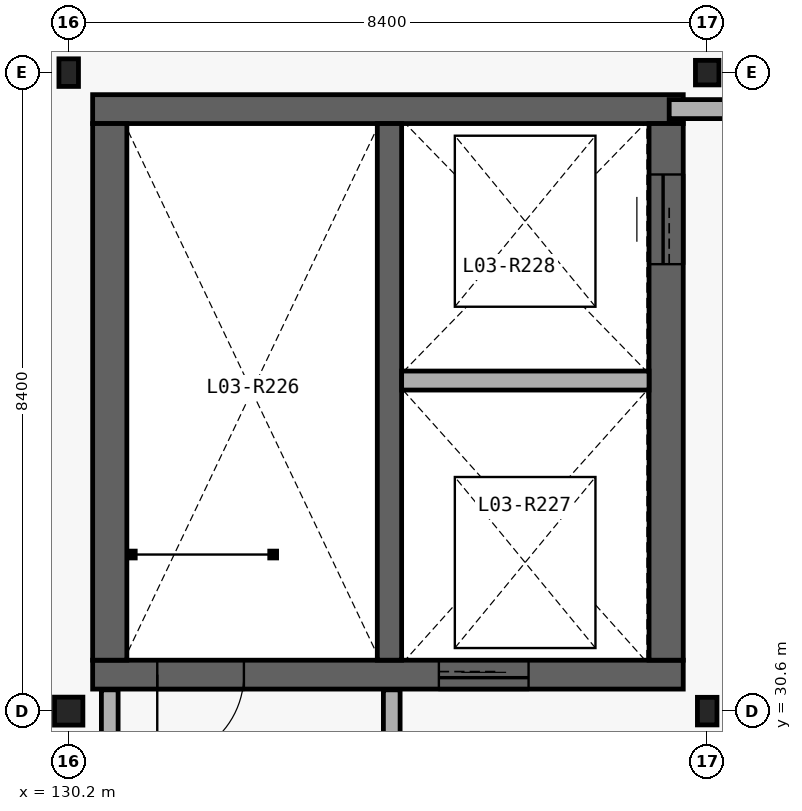
"""IFC4 building model, lengths in metres.
Left out: names, types, materials, properties, quantities, classifications, styles, units other than length and angle.
Written with IfcOpenShell. Run it as: python <this file> out.ifc"""

import sys

from ifc_helpers import new_model, si_unit, direction, frame, frame_2d, origin_with_axes, origin_2d_with_axis, place, context, subcontext, project, spatial, rectangle, i_section, extrude, element, fill, save


model = new_model("IFC4")
c1 = context("Model", 3, precision=1e-05, world=origin_with_axes(), true_north=direction((0.0, 1.0)))
c2 = subcontext(c1, "Body", "Model", "MODEL_VIEW")
j1 = project(units=[si_unit("LENGTHUNIT", "METRE"), si_unit("PLANEANGLEUNIT", "RADIAN")], contexts=[c1])
p1 = place(None, origin_with_axes())
s1 = spatial("IfcSite", under=j1, at=p1, CompositionType="ELEMENT")
p2 = place(p1, origin_with_axes())
s2 = spatial("IfcBuilding", under=s1, at=p2, CompositionType="ELEMENT")
p3 = place(p2, frame((0.0, 0.0, 15.6), z_axis=(0.0, 0.0, 1.0), x_axis=(1.0, 0.0, 0.0)))
s3 = spatial("IfcBuildingStorey", under=s2, at=p3, CompositionType="ELEMENT", Elevation=15.6)
p4 = place(None, frame((130.515, 31.08, 15.6), z_axis=(0.0, 0.0, 1.0), x_axis=(1.0, 0.0, 0.0)))
e1 = element("IfcWall", 1, at=p4, inside=s3, PredefinedType="SHEAR", context=c2, shape_type="SweptSolid", body=[
    extrude(rectangle(XDim=7.77, YDim=0.38, at=frame_2d((3.885, 0.0), x_axis=(1.0, 0.0))), origin_with_axes(), (0.0, 0.0, 1.0), 4.8),
])
p5 = place(None, frame((131.935, 31.08, 15.6), z_axis=(0.0, 0.0, 1.0), x_axis=(1.0, 0.0, 0.0)))
e2 = element("IfcOpeningElement", 2, at=p5, cuts=e1, PredefinedType="OPENING", context=c2, shape_type="SweptSolid", body=[
    extrude(rectangle(XDim=1.14, YDim=2.18, at=frame_2d((0.0, 1.09), x_axis=(1.0, 0.0))), frame((0.0, 0.2, 0.0), z_axis=(0.0, -1.0, 0.0), x_axis=(1.0, 0.0, 0.0)), (0.0, 0.0, 1.0), 0.4),
])
p6 = place(None, frame((135.66, 31.08, 15.6), z_axis=(0.0, 0.0, 1.0), x_axis=(1.0, 0.0, 0.0)))
e3 = element("IfcOpeningElement", 3, at=p6, cuts=e1, PredefinedType="OPENING", context=c2, shape_type="SweptSolid", body=[
    extrude(rectangle(XDim=1.18, YDim=2.24, at=frame_2d((0.0, 1.12), x_axis=(1.0, 0.0))), frame((0.0, 0.2, 0.0), z_axis=(0.0, -1.0, 0.0), x_axis=(1.0, 0.0, 0.0)), (0.0, 0.0, 1.0), 0.4),
])
p7 = place(None, frame((138.285, 38.52, 15.6), z_axis=(0.0, 0.0, 1.0), x_axis=(-1.0, 0.0, 0.0)))
e4 = element("IfcWall", 4, at=p7, inside=s3, PredefinedType="SHEAR", context=c2, shape_type="SweptSolid", body=[
    extrude(rectangle(XDim=7.77, YDim=0.38, at=frame_2d((3.885, 0.0), x_axis=(1.0, 0.0))), origin_with_axes(), (0.0, 0.0, 1.0), 4.8),
])
p8 = place(None, frame((138.06, 31.27, 15.6), z_axis=(0.0, 0.0, 1.0), x_axis=(0.0, 1.0, 0.0)))
e5 = element("IfcWall", 5, at=p8, inside=s3, PredefinedType="SHEAR", context=c2, shape_type="SweptSolid", body=[
    extrude(rectangle(XDim=7.06, YDim=0.45, at=frame_2d((3.53, 0.0), x_axis=(1.0, 0.0))), origin_with_axes(), (0.0, 0.0, 1.0), 4.8),
])
p9 = place(None, frame((138.06, 37.07, 15.6), z_axis=(0.0, 0.0, 1.0), x_axis=(0.0, 1.0, 0.0)))
e6 = element("IfcOpeningElement", 6, at=p9, cuts=e5, PredefinedType="OPENING", context=c2, shape_type="SweptSolid", body=[
    extrude(rectangle(XDim=1.18, YDim=2.24, at=frame_2d((0.0, 1.12), x_axis=(1.0, 0.0))), frame((0.0, 0.235, 0.0), z_axis=(0.0, -1.0, 0.0), x_axis=(1.0, 0.0, 0.0)), (0.0, 0.0, 1.0), 0.47),
])
p10 = place(None, frame((130.74, 38.33, 15.6), z_axis=(0.0, 0.0, 1.0), x_axis=(0.0, -1.0, 0.0)))
e7 = element("IfcWall", 7, at=p10, inside=s3, PredefinedType="SHEAR", context=c2, shape_type="SweptSolid", body=[
    extrude(rectangle(XDim=7.06, YDim=0.45, at=frame_2d((3.53, 0.0), x_axis=(1.0, 0.0))), origin_with_axes(), (0.0, 0.0, 1.0), 4.8),
])
p11 = place(None, frame((134.42, 31.27, 15.6), z_axis=(0.0, 0.0, 1.0), x_axis=(0.0, 1.0, 0.0)))
e8 = element("IfcWall", 8, at=p11, inside=s3, PredefinedType="SHEAR", context=c2, shape_type="SweptSolid", body=[
    extrude(rectangle(XDim=7.06, YDim=0.32, at=frame_2d((3.53, 0.0), x_axis=(1.0, 0.0))), origin_with_axes(), (0.0, 0.0, 1.0), 4.8),
])
p12 = place(None, frame((134.58, 34.949, 15.6), z_axis=(0.0, 0.0, 1.0), x_axis=(1.0, 0.0, 0.0)))
e9 = element("IfcWall", 9, at=p12, inside=s3, PredefinedType="PARTITIONING", context=c2, shape_type="SweptSolid", body=[
    extrude(rectangle(XDim=3.255, YDim=0.25, at=frame_2d((1.627, 0.0), x_axis=(1.0, 0.0))), origin_with_axes(), (0.0, 0.0, 1.0), 4.48),
])
p13 = place(None, frame((138.1, 38.52, 15.6), z_axis=(0.0, 0.0, 1.0), x_axis=(1.0, 0.0, 0.0)))
e10 = element("IfcWall", 10, at=p13, inside=s3, PredefinedType="PARTITIONING", context=c2, shape_type="SweptSolid", body=[
    extrude(rectangle(XDim=3.36, YDim=0.25, at=frame_2d((1.68, 0.0), x_axis=(1.0, 0.0))), origin_with_axes(), (0.0, 0.0, 1.0), 4.48),
])
for number, where, z_axis, x_axis in (
    (11, (130.74, 29.62, 15.6), (0.0, 0.0, 1.0), (0.0, 1.0, 0.0)),
    (12, (134.45, 29.62, 15.6), (0.0, 0.0, 1.0), (0.0, 1.0, 0.0)),
):
    element("IfcWall", number, at=place(None, frame(where, z_axis=z_axis, x_axis=x_axis)), inside=s3, PredefinedType="PARTITIONING", context=c2, shape_type="SweptSolid", body=[
        extrude(rectangle(XDim=1.26, YDim=0.22, at=frame_2d((0.63, 0.0), x_axis=(1.0, 0.0))), origin_with_axes(), (0.0, 0.0, 1.0), 4.48),
    ])
p14 = place(None, frame((130.2, 30.6, 15.6), z_axis=(0.0, 0.0, 1.0), x_axis=(1.0, 0.0, 0.0)))
e13 = element("IfcColumn", 13, at=p14, inside=s3, PredefinedType="COLUMN", context=c2, shape_type="SweptSolid", body=[
    extrude(i_section(OverallWidth=0.373, OverallDepth=0.368, WebThickness=0.015, FlangeThickness=0.024, at=origin_2d_with_axis()), origin_with_axes(), (0.0, 0.0, 1.0), 4.8),
])
for number, where, z_axis, x_axis in (
    (14, (130.2, 39.0, 15.6), (0.0, 0.0, 1.0), (1.0, 0.0, 0.0)),
    (15, (138.6, 30.6, 15.6), (0.0, 0.0, 1.0), (1.0, 0.0, 0.0)),
):
    element("IfcColumn", number, at=place(None, frame(where, z_axis=z_axis, x_axis=x_axis)), inside=s3, PredefinedType="COLUMN", context=c2, shape_type="SweptSolid", body=[
        extrude(i_section(OverallWidth=0.257, OverallDepth=0.363, WebThickness=0.013, FlangeThickness=0.022, at=origin_2d_with_axis()), origin_with_axes(), (0.0, 0.0, 1.0), 4.8),
    ])
p15 = place(None, frame((138.6, 39.0, 15.6), z_axis=(0.0, 0.0, 1.0), x_axis=(1.0, 0.0, 0.0)))
e16 = element("IfcColumn", 16, at=p15, inside=s3, PredefinedType="COLUMN", context=c2, shape_type="SweptSolid", body=[
    extrude(i_section(OverallWidth=0.309, OverallDepth=0.323, WebThickness=0.014, FlangeThickness=0.023, at=origin_2d_with_axis()), origin_with_axes(), (0.0, 0.0, 1.0), 4.8),
])
p16 = place(None, frame((131.935, 31.08, 15.6), z_axis=(0.0, 0.0, 1.0), x_axis=(-1.0, 0.0, 0.0)))
e17 = element("IfcDoor", 17, at=p16, inside=s3, OperationType="SINGLE_SWING_LEFT", PredefinedType="DOOR", context=c2, shape_type="SweptSolid", body=[
    extrude(rectangle(XDim=1.14, YDim=2.18, at=frame_2d((0.0, 1.09), x_axis=(1.0, 0.0))), frame((0.0, 0.04, 0.0), z_axis=(0.0, -1.0, 0.0), x_axis=(1.0, 0.0, 0.0)), (0.0, 0.0, 1.0), 0.08),
])
fill(e2, e17)
p17 = place(None, frame((135.66, 31.08, 15.6), z_axis=(0.0, 0.0, 1.0), x_axis=(-1.0, 0.0, 0.0)))
e18 = element("IfcDoor", 18, at=p17, inside=s3, OperationType="SLIDING_TO_LEFT", PredefinedType="DOOR", context=c2, shape_type="SweptSolid", body=[
    extrude(rectangle(XDim=1.18, YDim=2.24, at=frame_2d((0.0, 1.12), x_axis=(1.0, 0.0))), frame((0.0, 0.04, 0.0), z_axis=(0.0, -1.0, 0.0), x_axis=(1.0, 0.0, 0.0)), (0.0, 0.0, 1.0), 0.08),
])
fill(e3, e18)
p18 = place(None, frame((138.06, 37.07, 15.6), z_axis=(0.0, 0.0, 1.0), x_axis=(0.0, 1.0, 0.0)))
e19 = element("IfcDoor", 19, at=p18, inside=s3, OperationType="SLIDING_TO_LEFT", PredefinedType="DOOR", context=c2, shape_type="SweptSolid", body=[
    extrude(rectangle(XDim=1.18, YDim=2.24, at=frame_2d((0.0, 1.12), x_axis=(1.0, 0.0))), frame((0.0, 0.04, 0.0), z_axis=(0.0, -1.0, 0.0), x_axis=(1.0, 0.0, 0.0)), (0.0, 0.0, 1.0), 0.08),
])
fill(e6, e19)
save(model, sys.argv[1])
